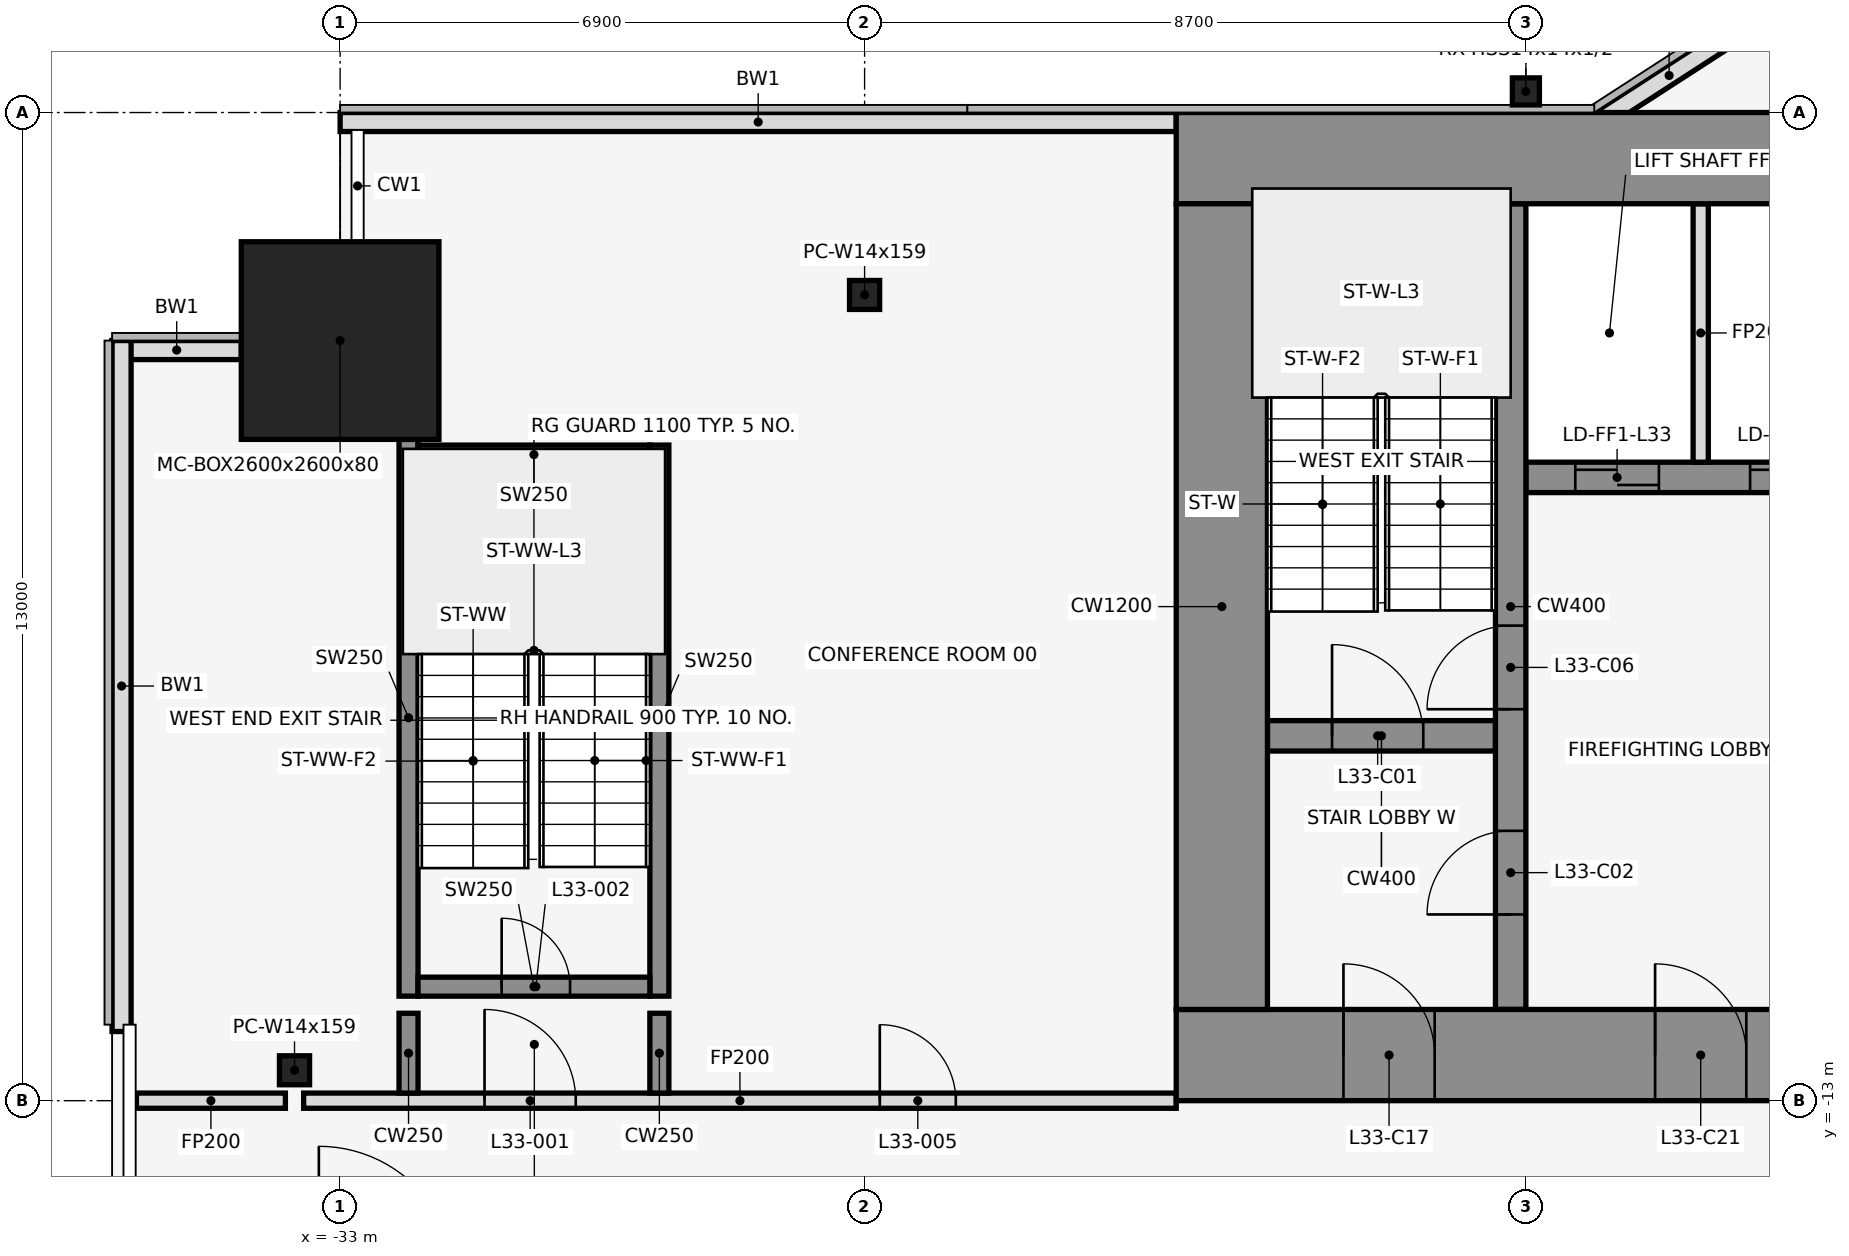
"""IFC4 building model, lengths in metres.
Left out: names, types, materials, properties, quantities, classifications, styles, units other than length and angle.
Written with IfcOpenShell. Run it as: python <this file> out.ifc"""

import sys

from ifc_helpers import new_model, si_unit, direction, frame, frame_2d, origin, origin_2d, place, context, subcontext, project, spatial, rectangle, hollow_rectangle, i_section, extrude, element, fill, save


model = new_model("IFC4")
c1 = context("Model", 3, precision=1e-05, world=origin(), true_north=direction((0.0, 1.0)))
c2 = subcontext(c1, "Body", "Model", "MODEL_VIEW")
j1 = project(units=[si_unit("LENGTHUNIT", "METRE"), si_unit("PLANEANGLEUNIT", "RADIAN")], contexts=[c1])
p1 = place(None, origin())
s1 = spatial("IfcSite", under=j1, at=p1, CompositionType="ELEMENT")
p2 = place(p1, origin())
s2 = spatial("IfcBuilding", under=s1, at=p2, CompositionType="ELEMENT")
p3 = place(p2, frame((0.0, 0.0, 152.7)))
s3 = spatial("IfcBuildingStorey", under=s2, at=p3, CompositionType="ELEMENT", Elevation=152.7)
p4 = place(p3, frame((-33.0, -3.0, 0.0), z_axis=(0.0, 0.0, 1.0), x_axis=(1.0, 0.0, 0.0)))
e1 = element("IfcColumn", 1, at=p4, inside=s3, PredefinedType="COLUMN", context=c2, shape_type="SweptSolid", body=[
    extrude(hollow_rectangle(XDim=2.6, YDim=2.6, WallThickness=0.08, at=origin_2d()), origin(), (0.0, 0.0, 1.0), 4.1),
])
p5 = place(p3, frame((-26.1, -2.4, 0.0), z_axis=(0.0, 0.0, 1.0), x_axis=(1.0, 0.0, 0.0)))
e2 = element("IfcColumn", 2, at=p5, inside=s3, PredefinedType="COLUMN", context=c2, shape_type="SweptSolid", body=[
    extrude(i_section(OverallWidth=0.396, OverallDepth=0.381, WebThickness=0.019, FlangeThickness=0.03, at=origin_2d()), origin(), (0.0, 0.0, 1.0), 4.1),
])
p6 = place(p3, frame((-17.4, 0.278, 0.0), z_axis=(0.0, 0.0, 1.0), x_axis=(1.0, 0.0, 0.0)))
e3 = element("IfcColumn", 3, at=p6, inside=s3, PredefinedType="COLUMN", context=c2, shape_type="SweptSolid", body=[
    extrude(hollow_rectangle(XDim=0.356, YDim=0.356, WallThickness=0.012, at=origin_2d()), origin(), (0.0, 0.0, 1.0), 4.1),
])
p7 = place(p3, frame((-33.6, -12.6, 0.0), z_axis=(0.0, 0.0, 1.0), x_axis=(1.0, 0.0, 0.0)))
e4 = element("IfcColumn", 4, at=p7, inside=s3, PredefinedType="COLUMN", context=c2, shape_type="SweptSolid", body=[
    extrude(i_section(OverallWidth=0.396, OverallDepth=0.381, WebThickness=0.019, FlangeThickness=0.03, at=origin_2d()), origin(), (0.0, 0.0, 1.0), 4.1),
])
p8 = place(p3, frame((-14.599, 1.08, 0.0), z_axis=(0.0, 0.0, 1.0), x_axis=(-0.83981312244, -0.542875602121, 0.0)))
e5 = element("IfcWall", 5, at=p8, inside=s3, PredefinedType="STANDARD", context=c2, shape_type="SweptSolid", body=[
    extrude(rectangle(XDim=2.183, YDim=0.25, at=frame_2d((1.091, 0.0))), origin(), (0.0, 0.0, 1.0), 3.95),
])
p9 = place(p3, frame((-22.0, -0.125, 0.0), z_axis=(0.0, 0.0, 1.0), x_axis=(-1.0, 0.0, 0.0)))
e6 = element("IfcWall", 6, at=p9, inside=s3, PredefinedType="STANDARD", context=c2, shape_type="SweptSolid", body=[
    extrude(rectangle(XDim=11.0, YDim=0.25, at=frame_2d((5.5, 0.0))), origin(), (0.0, 0.0, 1.0), 3.95),
])
p10 = place(p3, frame((-34.3, -3.125, 0.0), z_axis=(0.0, 0.0, 1.0), x_axis=(-1.0, 0.0, 0.0)))
e7 = element("IfcWall", 7, at=p10, inside=s3, PredefinedType="STANDARD", context=c2, shape_type="SweptSolid", body=[
    extrude(rectangle(XDim=1.7, YDim=0.25, at=frame_2d((0.85, 0.0))), origin(), (0.0, 0.0, 1.0), 3.95),
])
p11 = place(p3, frame((-35.875, -3.0, 0.0), z_axis=(0.0, 0.0, 1.0), x_axis=(0.0, -1.0, 0.0)))
e8 = element("IfcWall", 8, at=p11, inside=s3, PredefinedType="STANDARD", context=c2, shape_type="SweptSolid", body=[
    extrude(rectangle(XDim=9.09, YDim=0.25, at=frame_2d((4.545, 0.0))), origin(), (0.0, 0.0, 1.0), 3.95),
])
p12 = place(p3, frame((-32.1, -11.625, 0.0), z_axis=(0.0, 0.0, 1.0), x_axis=(0.0, 1.0, 0.0)))
e9 = element("IfcWall", 9, at=p12, inside=s3, PredefinedType="SHEAR", context=c2, shape_type="SweptSolid", body=[
    extrude(rectangle(XDim=7.325, YDim=0.25, at=frame_2d((3.663, 0.0))), origin(), (0.0, 0.0, 1.0), 4.1),
])
p13 = place(p3, frame((-28.8, -11.625, 0.0), z_axis=(0.0, 0.0, 1.0), x_axis=(0.0, 1.0, 0.0)))
e10 = element("IfcWall", 10, at=p13, inside=s3, PredefinedType="SHEAR", context=c2, shape_type="SweptSolid", body=[
    extrude(rectangle(XDim=7.25, YDim=0.25, at=frame_2d((3.625, 0.0))), origin(), (0.0, 0.0, 1.0), 4.1),
])
p14 = place(p3, frame((-31.975, -11.5, 0.0), z_axis=(0.0, 0.0, 1.0), x_axis=(1.0, 0.0, 0.0)))
e11 = element("IfcWall", 11, at=p14, inside=s3, PredefinedType="SHEAR", context=c2, shape_type="SweptSolid", body=[
    extrude(rectangle(XDim=3.05, YDim=0.25, at=frame_2d((1.525, 0.0))), origin(), (0.0, 0.0, 1.0), 4.1),
])
p15 = place(p14, frame((1.1, 0.0, 0.0)))
e12 = element("IfcOpeningElement", 12, at=p15, cuts=e11, PredefinedType="OPENING", context=c2, shape_type="SweptSolid", body=[
    extrude(rectangle(XDim=0.9, YDim=2.1, at=frame_2d((0.45, 1.05))), frame((0.0, 0.137, 0.0), z_axis=(0.0, -1.0, 0.0), x_axis=(1.0, 0.0, 0.0)), (0.0, 0.0, 1.0), 0.274),
])
p16 = place(p3, frame((-31.975, -4.5, 0.0), z_axis=(0.0, 0.0, 1.0), x_axis=(1.0, 0.0, 0.0)))
e13 = element("IfcWall", 13, at=p16, inside=s3, PredefinedType="SHEAR", context=c2, shape_type="SweptSolid", body=[
    extrude(rectangle(XDim=3.05, YDim=0.25, at=frame_2d((1.525, 0.0))), origin(), (0.0, 0.0, 1.0), 4.1),
])
p17 = place(p3, frame((-35.68, -13.0, 0.0), z_axis=(0.0, 0.0, 1.0), x_axis=(1.0, 0.0, 0.0)))
e14 = element("IfcWall", 14, at=p17, inside=s3, PredefinedType="PARTITIONING", context=c2, shape_type="SweptSolid", body=[
    extrude(rectangle(XDim=1.96, YDim=0.2, at=frame_2d((0.98, 0.0))), origin(), (0.0, 0.0, 1.0), 2.84),
])
p18 = place(p3, frame((-33.48, -13.0, 0.0), z_axis=(0.0, 0.0, 1.0), x_axis=(1.0, 0.0, 0.0)))
e15 = element("IfcWall", 15, at=p18, inside=s3, PredefinedType="PARTITIONING", context=c2, shape_type="SweptSolid", body=[
    extrude(rectangle(XDim=11.48, YDim=0.2, at=frame_2d((5.74, 0.0))), origin(), (0.0, 0.0, 1.0), 2.84),
])
p19 = place(p18, frame((2.38, 0.0, 0.0)))
e16 = element("IfcOpeningElement", 16, at=p19, cuts=e15, PredefinedType="OPENING", context=c2, shape_type="SweptSolid", body=[
    extrude(rectangle(XDim=1.2, YDim=2.1, at=frame_2d((0.6, 1.05))), frame((0.0, 0.112, 0.0), z_axis=(0.0, -1.0, 0.0), x_axis=(1.0, 0.0, 0.0)), (0.0, 0.0, 1.0), 0.224),
])
p20 = place(p18, frame((7.58, 0.0, 0.0)))
e17 = element("IfcOpeningElement", 17, at=p20, cuts=e15, PredefinedType="OPENING", context=c2, shape_type="SweptSolid", body=[
    extrude(rectangle(XDim=1.0, YDim=2.1, at=frame_2d((0.5, 1.05))), frame((0.0, 0.112, 0.0), z_axis=(0.0, -1.0, 0.0), x_axis=(1.0, 0.0, 0.0)), (0.0, 0.0, 1.0), 0.224),
])
for number, where, z_axis, x_axis in (
    (18, (-32.1, -12.9, 0.0), (0.0, 0.0, 1.0), (0.0, 1.0, 0.0)),
    (19, (-28.8, -12.9, 0.0), (0.0, 0.0, 1.0), (0.0, 1.0, 0.0)),
):
    element("IfcWall", number, at=place(p3, frame(where, z_axis=z_axis, x_axis=x_axis)), inside=s3, PredefinedType="SHEAR", context=c2, shape_type="SweptSolid", body=[
        extrude(rectangle(XDim=1.05, YDim=0.25, at=frame_2d((0.525, 0.0))), origin(), (0.0, 0.0, 1.0), 4.1),
    ])
p21 = place(p3, frame((-20.8, -8.2, 0.0), z_axis=(0.0, 0.0, 1.0), x_axis=(1.0, 0.0, 0.0)))
e20 = element("IfcWall", 20, at=p21, inside=s3, PredefinedType="SHEAR", context=c2, shape_type="SweptSolid", body=[
    extrude(rectangle(XDim=3.0, YDim=0.4, at=frame_2d((1.5, 0.0))), origin(), (0.0, 0.0, 1.0), 4.1),
])
p22 = place(p21, frame((0.85, 0.0, 0.0)))
e21 = element("IfcOpeningElement", 21, at=p22, cuts=e20, PredefinedType="OPENING", context=c2, shape_type="SweptSolid", body=[
    extrude(rectangle(XDim=1.2, YDim=2.1, at=frame_2d((0.6, 1.05))), frame((0.0, 0.212, 0.0), z_axis=(0.0, -1.0, 0.0), x_axis=(1.0, 0.0, 0.0)), (0.0, 0.0, 1.0), 0.424),
])
p23 = place(p3, frame((-17.4, -4.8, 0.0), z_axis=(0.0, 0.0, 1.0), x_axis=(1.0, 0.0, 0.0)))
e22 = element("IfcWall", 22, at=p23, inside=s3, PredefinedType="SHEAR", context=c2, shape_type="SweptSolid", body=[
    extrude(rectangle(XDim=13.6, YDim=0.4, at=frame_2d((6.8, 0.0))), origin(), (0.0, 0.0, 1.0), 4.1),
])
p24 = place(p23, frame((0.65, 0.0, 0.0)))
e23 = element("IfcOpeningElement", 23, at=p24, cuts=e22, PredefinedType="OPENING", context=c2, shape_type="SweptSolid", body=[
    extrude(rectangle(XDim=1.1, YDim=2.1, at=frame_2d((0.55, 1.05))), frame((0.0, 0.212, 0.0), z_axis=(0.0, -1.0, 0.0), x_axis=(1.0, 0.0, 0.0)), (0.0, 0.0, 1.0), 0.424),
])
p25 = place(p23, frame((2.95, 0.0, 0.0)))
e24 = element("IfcOpeningElement", 24, at=p25, cuts=e22, PredefinedType="OPENING", context=c2, shape_type="SweptSolid", body=[
    extrude(rectangle(XDim=1.1, YDim=2.1, at=frame_2d((0.55, 1.05))), frame((0.0, 0.212, 0.0), z_axis=(0.0, -1.0, 0.0), x_axis=(1.0, 0.0, 0.0)), (0.0, 0.0, 1.0), 0.424),
])
p26 = place(p23, frame((8.75, 0.0, 0.0)))
e25 = element("IfcOpeningElement", 25, at=p26, cuts=e22, PredefinedType="OPENING", context=c2, shape_type="SweptSolid", body=[
    extrude(rectangle(XDim=0.9, YDim=2.1, at=frame_2d((0.45, 1.05))), frame((0.0, 0.212, 0.0), z_axis=(0.0, -1.0, 0.0), x_axis=(1.0, 0.0, 0.0)), (0.0, 0.0, 1.0), 0.424),
])
p27 = place(p3, frame((-17.6, -11.8, 0.0), z_axis=(0.0, 0.0, 1.0), x_axis=(0.0, 1.0, 0.0)))
e26 = element("IfcWall", 26, at=p27, inside=s3, PredefinedType="SHEAR", context=c2, shape_type="SweptSolid", body=[
    extrude(rectangle(XDim=10.6, YDim=0.4, at=frame_2d((5.3, 0.0))), origin(), (0.0, 0.0, 1.0), 4.1),
])
p28 = place(p27, frame((1.25, 0.0, 0.0)))
e27 = element("IfcOpeningElement", 27, at=p28, cuts=e26, PredefinedType="OPENING", context=c2, shape_type="SweptSolid", body=[
    extrude(rectangle(XDim=1.1, YDim=2.1, at=frame_2d((0.55, 1.05))), frame((0.0, 0.212, 0.0), z_axis=(0.0, -1.0, 0.0), x_axis=(1.0, 0.0, 0.0)), (0.0, 0.0, 1.0), 0.424),
])
p29 = place(p27, frame((3.95, 0.0, 0.0)))
e28 = element("IfcOpeningElement", 28, at=p29, cuts=e26, PredefinedType="OPENING", context=c2, shape_type="SweptSolid", body=[
    extrude(rectangle(XDim=1.1, YDim=2.1, at=frame_2d((0.55, 1.05))), frame((0.0, 0.212, 0.0), z_axis=(0.0, -1.0, 0.0), x_axis=(1.0, 0.0, 0.0)), (0.0, 0.0, 1.0), 0.424),
])
p30 = place(p3, frame((-15.1, -4.6, 0.0), z_axis=(0.0, 0.0, 1.0), x_axis=(0.0, 1.0, 0.0)))
e29 = element("IfcWall", 29, at=p30, inside=s3, PredefinedType="PARTITIONING", context=c2, shape_type="SweptSolid", body=[
    extrude(rectangle(XDim=3.4, YDim=0.2, at=frame_2d((1.7, 0.0))), origin(), (0.0, 0.0, 1.0), 2.84),
])
p31 = place(p3, frame((-22.0, -0.6, 0.0), z_axis=(0.0, 0.0, 1.0), x_axis=(1.0, 0.0, 0.0)))
e30 = element("IfcWall", 30, at=p31, inside=s3, PredefinedType="SHEAR", context=c2, shape_type="SweptSolid", body=[
    extrude(rectangle(XDim=44.0, YDim=1.2, at=frame_2d((22.0, 0.0))), origin(), (0.0, 0.0, 1.0), 4.1),
])
p32 = place(p31, frame((18.55, 0.0, 0.0)))
e31 = element("IfcOpeningElement", 31, at=p32, cuts=e30, PredefinedType="OPENING", context=c2, shape_type="SweptSolid", body=[
    extrude(rectangle(XDim=0.9, YDim=2.1, at=frame_2d((0.45, 1.05))), frame((0.0, 0.612, 0.0), z_axis=(0.0, -1.0, 0.0), x_axis=(1.0, 0.0, 0.0)), (0.0, 0.0, 1.0), 1.224),
])
p33 = place(p31, frame((24.55, 0.0, 0.0)))
e32 = element("IfcOpeningElement", 32, at=p33, cuts=e30, PredefinedType="OPENING", context=c2, shape_type="SweptSolid", body=[
    extrude(rectangle(XDim=0.9, YDim=2.1, at=frame_2d((0.45, 1.05))), frame((0.0, 0.612, 0.0), z_axis=(0.0, -1.0, 0.0), x_axis=(1.0, 0.0, 0.0)), (0.0, 0.0, 1.0), 1.224),
])
p34 = place(p3, frame((-22.0, -12.4, 0.0), z_axis=(0.0, 0.0, 1.0), x_axis=(1.0, 0.0, 0.0)))
e33 = element("IfcWall", 33, at=p34, inside=s3, PredefinedType="SHEAR", context=c2, shape_type="SweptSolid", body=[
    extrude(rectangle(XDim=44.0, YDim=1.2, at=frame_2d((22.0, 0.0))), origin(), (0.0, 0.0, 1.0), 4.1),
])
p35 = place(p34, frame((2.2, 0.0, 0.0)))
e34 = element("IfcOpeningElement", 34, at=p35, cuts=e33, PredefinedType="OPENING", context=c2, shape_type="SweptSolid", body=[
    extrude(rectangle(XDim=1.2, YDim=2.1, at=frame_2d((0.6, 1.05))), frame((0.0, 0.612, 0.0), z_axis=(0.0, -1.0, 0.0), x_axis=(1.0, 0.0, 0.0)), (0.0, 0.0, 1.0), 1.224),
])
p36 = place(p34, frame((21.4, 0.0, 0.0)))
e35 = element("IfcOpeningElement", 35, at=p36, cuts=e33, PredefinedType="OPENING", context=c2, shape_type="SweptSolid", body=[
    extrude(rectangle(XDim=1.2, YDim=2.1, at=frame_2d((0.6, 1.05))), frame((0.0, 0.612, 0.0), z_axis=(0.0, -1.0, 0.0), x_axis=(1.0, 0.0, 0.0)), (0.0, 0.0, 1.0), 1.224),
])
p37 = place(p34, frame((40.6, 0.0, 0.0)))
e36 = element("IfcOpeningElement", 36, at=p37, cuts=e33, PredefinedType="OPENING", context=c2, shape_type="SweptSolid", body=[
    extrude(rectangle(XDim=1.2, YDim=2.1, at=frame_2d((0.6, 1.05))), frame((0.0, 0.612, 0.0), z_axis=(0.0, -1.0, 0.0), x_axis=(1.0, 0.0, 0.0)), (0.0, 0.0, 1.0), 1.224),
])
p38 = place(p34, frame((16.0, 0.0, 0.0)))
e37 = element("IfcOpeningElement", 37, at=p38, cuts=e33, PredefinedType="OPENING", context=c2, shape_type="SweptSolid", body=[
    extrude(rectangle(XDim=1.8, YDim=2.1, at=frame_2d((0.9, 1.05))), frame((0.0, 0.612, 0.0), z_axis=(0.0, -1.0, 0.0), x_axis=(1.0, 0.0, 0.0)), (0.0, 0.0, 1.0), 1.224),
])
p39 = place(p34, frame((6.3, 0.0, 0.0)))
e38 = element("IfcOpeningElement", 38, at=p39, cuts=e33, PredefinedType="OPENING", context=c2, shape_type="SweptSolid", body=[
    extrude(rectangle(XDim=1.2, YDim=2.1, at=frame_2d((0.6, 1.05))), frame((0.0, 0.612, 0.0), z_axis=(0.0, -1.0, 0.0), x_axis=(1.0, 0.0, 0.0)), (0.0, 0.0, 1.0), 1.224),
])
p40 = place(p34, frame((26.2, 0.0, 0.0)))
e39 = element("IfcOpeningElement", 39, at=p40, cuts=e33, PredefinedType="OPENING", context=c2, shape_type="SweptSolid", body=[
    extrude(rectangle(XDim=1.8, YDim=2.1, at=frame_2d((0.9, 1.05))), frame((0.0, 0.612, 0.0), z_axis=(0.0, -1.0, 0.0), x_axis=(1.0, 0.0, 0.0)), (0.0, 0.0, 1.0), 1.224),
])
p41 = place(p34, frame((36.5, 0.0, 0.0)))
e40 = element("IfcOpeningElement", 40, at=p41, cuts=e33, PredefinedType="OPENING", context=c2, shape_type="SweptSolid", body=[
    extrude(rectangle(XDim=1.2, YDim=2.1, at=frame_2d((0.6, 1.05))), frame((0.0, 0.612, 0.0), z_axis=(0.0, -1.0, 0.0), x_axis=(1.0, 0.0, 0.0)), (0.0, 0.0, 1.0), 1.224),
])
p42 = place(p3, frame((-21.4, -11.8, 0.0), z_axis=(0.0, 0.0, 1.0), x_axis=(0.0, 1.0, 0.0)))
e41 = element("IfcWall", 41, at=p42, inside=s3, PredefinedType="SHEAR", context=c2, shape_type="SweptSolid", body=[
    extrude(rectangle(XDim=10.6, YDim=1.2, at=frame_2d((5.3, 0.0))), origin(), (0.0, 0.0, 1.0), 4.1),
])
p43 = place(p19, origin())
e42 = element("IfcDoor", 42, at=p43, inside=s3, OperationType="SINGLE_SWING_LEFT", PredefinedType="DOOR", context=c2, shape_type="SweptSolid", body=[
    extrude(rectangle(XDim=1.2, YDim=2.1, at=frame_2d((0.6, 1.05))), frame((0.0, 0.025, 0.0), z_axis=(0.0, -1.0, 0.0), x_axis=(1.0, 0.0, 0.0)), (0.0, 0.0, 1.0), 0.05),
])
fill(e16, e42)
p44 = place(p15, origin())
e43 = element("IfcDoor", 43, at=p44, inside=s3, OperationType="SINGLE_SWING_LEFT", PredefinedType="DOOR", context=c2, shape_type="SweptSolid", body=[
    extrude(rectangle(XDim=0.9, YDim=2.1, at=frame_2d((0.45, 1.05))), frame((0.0, 0.025, 0.0), z_axis=(0.0, -1.0, 0.0), x_axis=(1.0, 0.0, 0.0)), (0.0, 0.0, 1.0), 0.05),
])
fill(e12, e43)
p45 = place(p20, origin())
e44 = element("IfcDoor", 44, at=p45, inside=s3, OperationType="SINGLE_SWING_LEFT", PredefinedType="DOOR", context=c2, shape_type="SweptSolid", body=[
    extrude(rectangle(XDim=1.0, YDim=2.1, at=frame_2d((0.5, 1.05))), frame((0.0, 0.025, 0.0), z_axis=(0.0, -1.0, 0.0), x_axis=(1.0, 0.0, 0.0)), (0.0, 0.0, 1.0), 0.05),
])
fill(e17, e44)
p46 = place(p22, origin())
e45 = element("IfcDoor", 45, at=p46, inside=s3, OperationType="SINGLE_SWING_LEFT", PredefinedType="DOOR", context=c2, shape_type="SweptSolid", body=[
    extrude(rectangle(XDim=1.2, YDim=2.1, at=frame_2d((0.6, 1.05))), frame((0.0, 0.025, 0.0), z_axis=(0.0, -1.0, 0.0), x_axis=(1.0, 0.0, 0.0)), (0.0, 0.0, 1.0), 0.05),
])
fill(e21, e45)
p47 = place(p28, frame((1.1, 0.0, 0.0), z_axis=(0.0, 0.0, 1.0), x_axis=(-1.0, 0.0, 0.0)))
e46 = element("IfcDoor", 46, at=p47, inside=s3, OperationType="SINGLE_SWING_LEFT", PredefinedType="DOOR", context=c2, shape_type="SweptSolid", body=[
    extrude(rectangle(XDim=1.1, YDim=2.1, at=frame_2d((0.55, 1.05))), frame((0.0, 0.025, 0.0), z_axis=(0.0, -1.0, 0.0), x_axis=(1.0, 0.0, 0.0)), (0.0, 0.0, 1.0), 0.05),
])
fill(e27, e46)
p48 = place(p24, origin())
e47 = element("IfcDoor", 47, at=p48, inside=s3, OperationType="DOUBLE_DOOR_SLIDING", PredefinedType="DOOR", context=c2, shape_type="SweptSolid", body=[
    extrude(rectangle(XDim=1.1, YDim=2.1, at=frame_2d((0.55, 1.05))), frame((0.0, 0.025, 0.0), z_axis=(0.0, -1.0, 0.0), x_axis=(1.0, 0.0, 0.0)), (0.0, 0.0, 1.0), 0.05),
])
fill(e23, e47)
p49 = place(p25, origin())
e48 = element("IfcDoor", 48, at=p49, inside=s3, OperationType="DOUBLE_DOOR_SLIDING", PredefinedType="DOOR", context=c2, shape_type="SweptSolid", body=[
    extrude(rectangle(XDim=1.1, YDim=2.1, at=frame_2d((0.55, 1.05))), frame((0.0, 0.025, 0.0), z_axis=(0.0, -1.0, 0.0), x_axis=(1.0, 0.0, 0.0)), (0.0, 0.0, 1.0), 0.05),
])
fill(e24, e48)
p50 = place(p29, frame((1.1, 0.0, 0.0), z_axis=(0.0, 0.0, 1.0), x_axis=(-1.0, 0.0, 0.0)))
e49 = element("IfcDoor", 49, at=p50, inside=s3, OperationType="SINGLE_SWING_LEFT", PredefinedType="DOOR", context=c2, shape_type="SweptSolid", body=[
    extrude(rectangle(XDim=1.1, YDim=2.1, at=frame_2d((0.55, 1.05))), frame((0.0, 0.025, 0.0), z_axis=(0.0, -1.0, 0.0), x_axis=(1.0, 0.0, 0.0)), (0.0, 0.0, 1.0), 0.05),
])
fill(e28, e49)
p51 = place(p35, frame((1.2, 0.0, 0.0), z_axis=(0.0, 0.0, 1.0), x_axis=(-1.0, 0.0, 0.0)))
e50 = element("IfcDoor", 50, at=p51, inside=s3, OperationType="SINGLE_SWING_RIGHT", PredefinedType="DOOR", context=c2, shape_type="SweptSolid", body=[
    extrude(rectangle(XDim=1.2, YDim=2.1, at=frame_2d((0.6, 1.05))), frame((0.0, 0.025, 0.0), z_axis=(0.0, -1.0, 0.0), x_axis=(1.0, 0.0, 0.0)), (0.0, 0.0, 1.0), 0.05),
])
fill(e34, e50)
p52 = place(p39, frame((1.2, 0.0, 0.0), z_axis=(0.0, 0.0, 1.0), x_axis=(-1.0, 0.0, 0.0)))
e51 = element("IfcDoor", 51, at=p52, inside=s3, OperationType="SINGLE_SWING_RIGHT", PredefinedType="DOOR", context=c2, shape_type="SweptSolid", body=[
    extrude(rectangle(XDim=1.2, YDim=2.1, at=frame_2d((0.6, 1.05))), frame((0.0, 0.025, 0.0), z_axis=(0.0, -1.0, 0.0), x_axis=(1.0, 0.0, 0.0)), (0.0, 0.0, 1.0), 0.05),
])
fill(e38, e51)
save(model, sys.argv[1])
